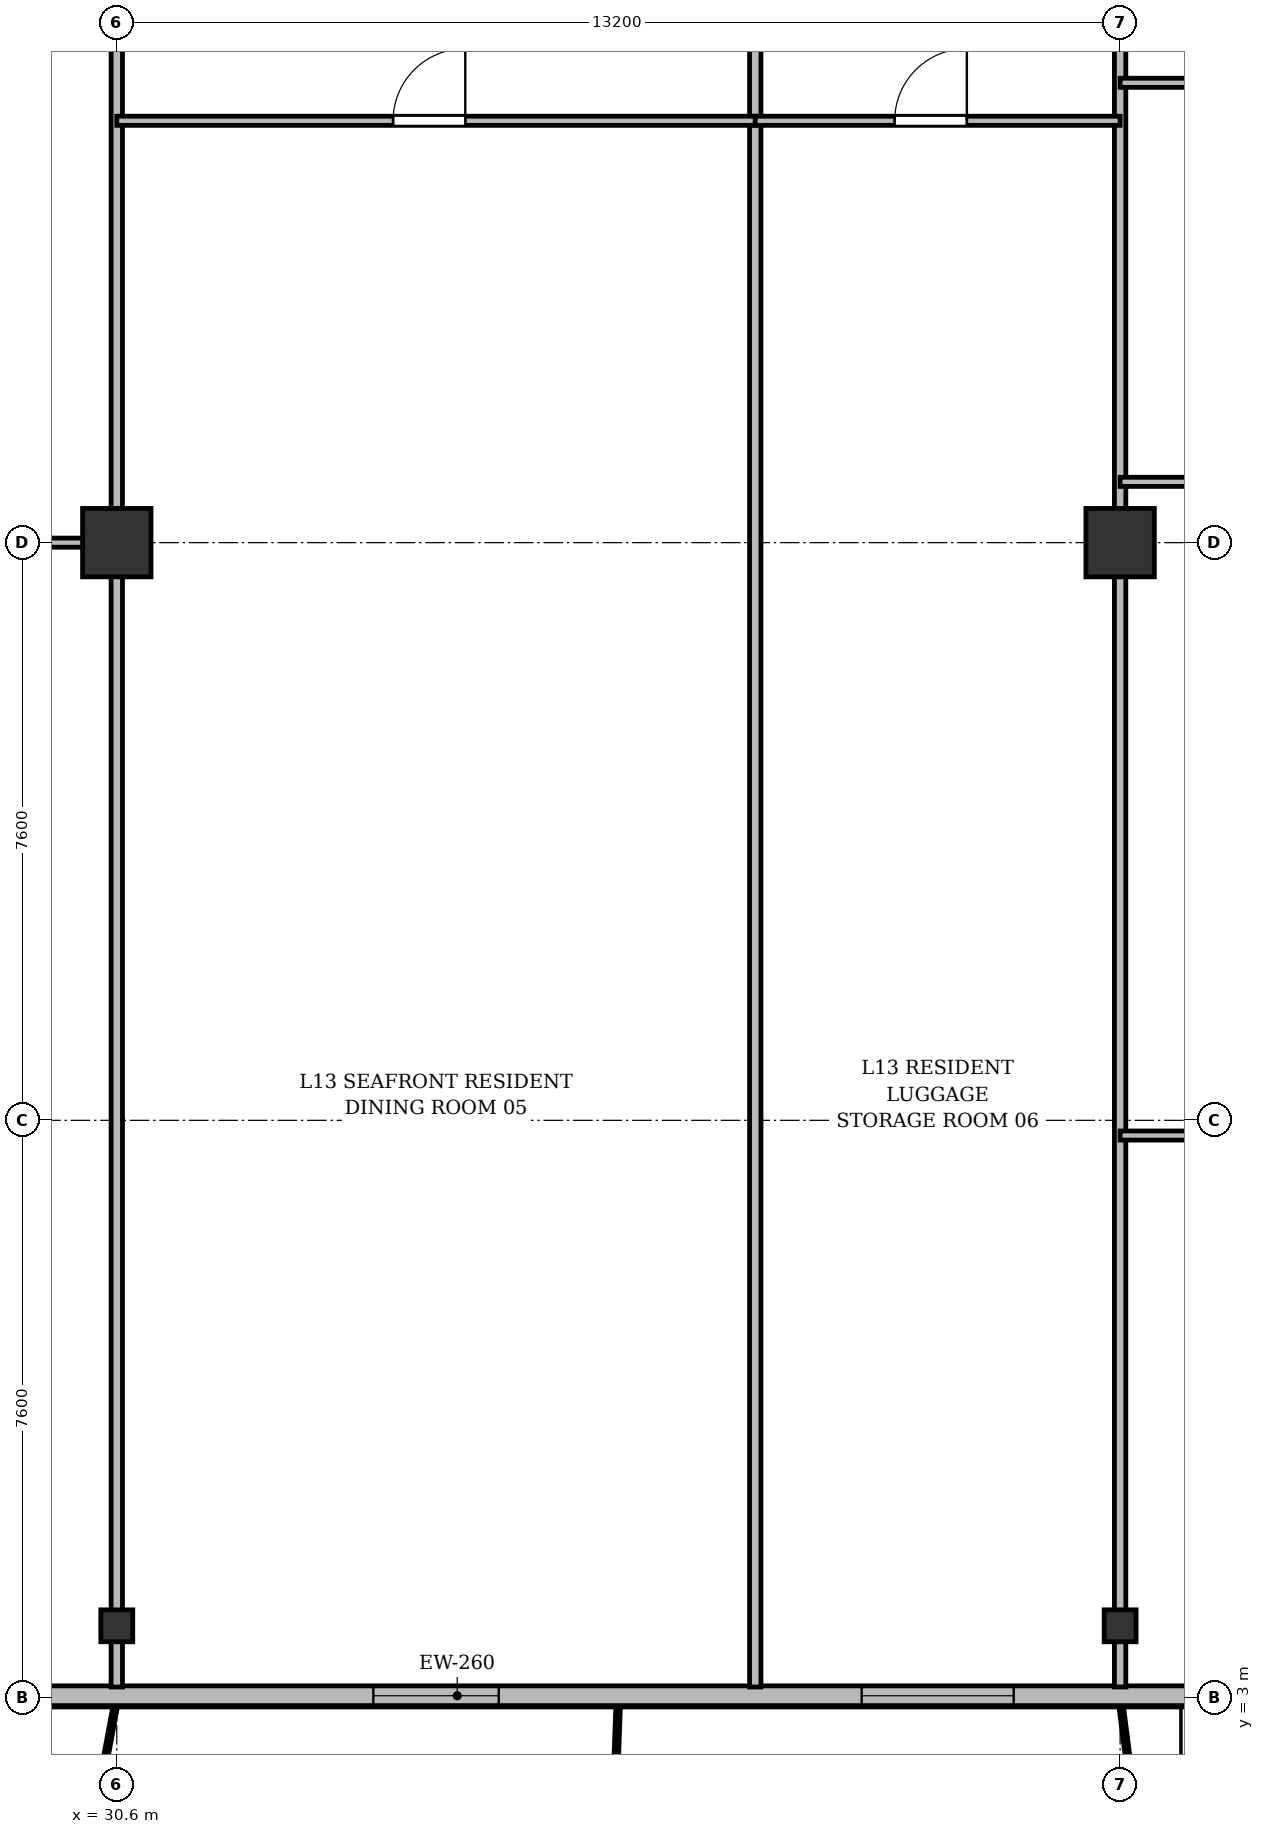
"""IFC4 building model, lengths in metres.
Left out: names, types, materials, properties, quantities, classifications, styles, units other than length and angle.
Written with IfcOpenShell. Run it as: python <this file> out.ifc"""

import sys

from ifc_helpers import new_model, si_unit, direction, frame, frame_2d, origin, origin_2d, place, context, subcontext, project, spatial, rectangle, i_section, extrude, source, transform, mapped, element, fill, save


model = new_model("IFC4")
c1 = context("Model", 3, precision=1e-05, world=origin(), true_north=direction((0.0, 1.0)))
c2 = subcontext(c1, "Body", "Model", "MODEL_VIEW")
j1 = project(units=[si_unit("LENGTHUNIT", "METRE"), si_unit("PLANEANGLEUNIT", "RADIAN")], contexts=[c1])
p1 = place(None, origin())
s1 = spatial("IfcSite", under=j1, at=p1, CompositionType="ELEMENT")
p2 = place(p1, origin())
s2 = spatial("IfcBuilding", under=s1, at=p2, CompositionType="ELEMENT")
p3 = place(p2, frame((0.0, 0.0, 52.3)))
s3 = spatial("IfcBuildingStorey", under=s2, at=p3, CompositionType="ELEMENT", Elevation=52.3)
m1 = source(origin(), c2, "Body", "SweptSolid", [
    extrude(i_section(OverallWidth=0.42, OverallDepth=0.42, WebThickness=0.026, FlangeThickness=0.04, at=origin_2d()), origin(), (0.0, 0.0, 1.0), 3.6),
])
p4 = place(p3, frame((30.6, 3.95, 0.0), z_axis=(0.0, 0.0, 1.0), x_axis=(1.0, 0.0, 0.0)))
e1 = element("IfcColumn", 1, at=p4, inside=s3, PredefinedType="COLUMN", context=c2, shape_type="MappedRepresentation", body=[
    mapped(m1, transform((0.0, 0.0, 0.0), x_axis=(1.0, 0.0, 0.0), y_axis=(0.0, 1.0, 0.0), z_axis=(0.0, 0.0, 1.0), scale=1.0)),
])
m2 = source(origin(), c2, "Body", "SweptSolid", [
    extrude(rectangle(XDim=0.9, YDim=0.9, at=origin_2d()), origin(), (0.0, 0.0, 1.0), 3.6),
])
p5 = place(p3, frame((30.6, 18.2, 0.0), z_axis=(0.0, 0.0, 1.0), x_axis=(1.0, 0.0, 0.0)))
e2 = element("IfcColumn", 2, at=p5, inside=s3, PredefinedType="COLUMN", context=c2, shape_type="MappedRepresentation", body=[
    mapped(m2, transform((0.0, 0.0, 0.0), x_axis=(1.0, 0.0, 0.0), y_axis=(0.0, 1.0, 0.0), z_axis=(0.0, 0.0, 1.0), scale=1.0)),
])
p6 = place(p3, frame((43.8, 3.95, 0.0), z_axis=(0.0, 0.0, 1.0), x_axis=(1.0, 0.0, 0.0)))
e3 = element("IfcColumn", 3, at=p6, inside=s3, PredefinedType="COLUMN", context=c2, shape_type="MappedRepresentation", body=[
    mapped(m1, transform((0.0, 0.0, 0.0), x_axis=(1.0, 0.0, 0.0), y_axis=(0.0, 1.0, 0.0), z_axis=(0.0, 0.0, 1.0), scale=1.0)),
])
p7 = place(p3, frame((43.8, 18.2, 0.0), z_axis=(0.0, 0.0, 1.0), x_axis=(1.0, 0.0, 0.0)))
e4 = element("IfcColumn", 4, at=p7, inside=s3, PredefinedType="COLUMN", context=c2, shape_type="MappedRepresentation", body=[
    mapped(m2, transform((0.0, 0.0, 0.0), x_axis=(1.0, 0.0, 0.0), y_axis=(0.0, 1.0, 0.0), z_axis=(0.0, 0.0, 1.0), scale=1.0)),
])
p8 = place(p3, frame((66.9, 3.03, 0.0), z_axis=(0.0, 0.0, 1.0), x_axis=(-1.0, 0.0, 0.0)))
e5 = element("IfcWall", 5, at=p8, inside=s3, PredefinedType="SOLIDWALL", context=c2, shape_type="SweptSolid", body=[
    extrude(rectangle(XDim=59.4, YDim=0.26, at=frame_2d((29.7, 0.0))), origin(), (0.0, 0.0, 1.0), 3.34),
])
p9 = place(p8, frame((0.495, 0.0, 0.9)))
e6 = element("IfcOpeningElement", 6, at=p9, cuts=e5, PredefinedType="OPENING", context=c2, shape_type="SweptSolid", body=[
    extrude(rectangle(XDim=2.0, YDim=1.95, at=frame_2d((1.0, 0.975))), frame((0.0, 0.14, 0.0), z_axis=(0.0, -1.0, 0.0), x_axis=(1.0, 0.0, 0.0)), (0.0, 0.0, 1.0), 0.28),
])
p10 = place(p8, frame((4.675, 0.0, 0.9)))
e7 = element("IfcOpeningElement", 7, at=p10, cuts=e5, PredefinedType="OPENING", context=c2, shape_type="SweptSolid", body=[
    extrude(rectangle(XDim=1.65, YDim=1.85, at=frame_2d((0.825, 0.925))), frame((0.0, 0.14, 0.0), z_axis=(0.0, -1.0, 0.0), x_axis=(1.0, 0.0, 0.0)), (0.0, 0.0, 1.0), 0.28),
])
p11 = place(p8, frame((11.1, 0.0, 0.9)))
e8 = element("IfcOpeningElement", 8, at=p11, cuts=e5, PredefinedType="OPENING", context=c2, shape_type="SweptSolid", body=[
    extrude(rectangle(XDim=1.8, YDim=1.8, at=frame_2d((0.9, 0.9))), frame((0.0, 0.14, 0.0), z_axis=(0.0, -1.0, 0.0), x_axis=(1.0, 0.0, 0.0)), (0.0, 0.0, 1.0), 0.28),
])
p12 = place(p8, frame((17.007, 0.0, 0.0)))
e9 = element("IfcOpeningElement", 9, at=p12, cuts=e5, PredefinedType="OPENING", context=c2, shape_type="SweptSolid", body=[
    extrude(rectangle(XDim=1.2, YDim=2.2, at=frame_2d((0.6, 1.1))), frame((0.0, 0.14, 0.0), z_axis=(0.0, -1.0, 0.0), x_axis=(1.0, 0.0, 0.0)), (0.0, 0.0, 1.0), 0.28),
])
p13 = place(p8, frame((20.55, 0.0, 0.9)))
e10 = element("IfcOpeningElement", 10, at=p13, cuts=e5, PredefinedType="OPENING", context=c2, shape_type="SweptSolid", body=[
    extrude(rectangle(XDim=1.5, YDim=1.75, at=frame_2d((0.75, 0.875))), frame((0.0, 0.14, 0.0), z_axis=(0.0, -1.0, 0.0), x_axis=(1.0, 0.0, 0.0)), (0.0, 0.0, 1.0), 0.28),
])
p14 = place(p8, frame((24.5, 0.0, 0.9)))
e11 = element("IfcOpeningElement", 11, at=p14, cuts=e5, PredefinedType="OPENING", context=c2, shape_type="SweptSolid", body=[
    extrude(rectangle(XDim=2.0, YDim=1.95, at=frame_2d((1.0, 0.975))), frame((0.0, 0.14, 0.0), z_axis=(0.0, -1.0, 0.0), x_axis=(1.0, 0.0, 0.0)), (0.0, 0.0, 1.0), 0.28),
])
p15 = place(p8, frame((31.275, 0.0, 0.9)))
e12 = element("IfcOpeningElement", 12, at=p15, cuts=e5, PredefinedType="OPENING", context=c2, shape_type="SweptSolid", body=[
    extrude(rectangle(XDim=1.65, YDim=1.85, at=frame_2d((0.825, 0.925))), frame((0.0, 0.14, 0.0), z_axis=(0.0, -1.0, 0.0), x_axis=(1.0, 0.0, 0.0)), (0.0, 0.0, 1.0), 0.28),
])
p16 = place(p8, frame((39.0, 0.0, 0.9)))
e13 = element("IfcOpeningElement", 13, at=p16, cuts=e5, PredefinedType="OPENING", context=c2, shape_type="SweptSolid", body=[
    extrude(rectangle(XDim=1.8, YDim=1.8, at=frame_2d((0.9, 0.9))), frame((0.0, 0.14, 0.0), z_axis=(0.0, -1.0, 0.0), x_axis=(1.0, 0.0, 0.0)), (0.0, 0.0, 1.0), 0.28),
])
p17 = place(p8, frame((45.435, 0.0, 0.0)))
e14 = element("IfcOpeningElement", 14, at=p17, cuts=e5, PredefinedType="OPENING", context=c2, shape_type="SweptSolid", body=[
    extrude(rectangle(XDim=1.2, YDim=2.2, at=frame_2d((0.6, 1.1))), frame((0.0, 0.14, 0.0), z_axis=(0.0, -1.0, 0.0), x_axis=(1.0, 0.0, 0.0)), (0.0, 0.0, 1.0), 0.28),
])
p18 = place(p8, frame((48.6, 0.0, 0.9)))
e15 = element("IfcOpeningElement", 15, at=p18, cuts=e5, PredefinedType="OPENING", context=c2, shape_type="SweptSolid", body=[
    extrude(rectangle(XDim=1.5, YDim=1.75, at=frame_2d((0.75, 0.875))), frame((0.0, 0.14, 0.0), z_axis=(0.0, -1.0, 0.0), x_axis=(1.0, 0.0, 0.0)), (0.0, 0.0, 1.0), 0.28),
])
p19 = place(p8, frame((52.1, 0.0, 0.9)))
e16 = element("IfcOpeningElement", 16, at=p19, cuts=e5, PredefinedType="OPENING", context=c2, shape_type="SweptSolid", body=[
    extrude(rectangle(XDim=2.0, YDim=1.95, at=frame_2d((1.0, 0.975))), frame((0.0, 0.14, 0.0), z_axis=(0.0, -1.0, 0.0), x_axis=(1.0, 0.0, 0.0)), (0.0, 0.0, 1.0), 0.28),
])
p20 = place(p8, frame((56.28, 0.0, 0.9)))
e17 = element("IfcOpeningElement", 17, at=p20, cuts=e5, PredefinedType="OPENING", context=c2, shape_type="SweptSolid", body=[
    extrude(rectangle(XDim=1.65, YDim=1.85, at=frame_2d((0.825, 0.925))), frame((0.0, 0.14, 0.0), z_axis=(0.0, -1.0, 0.0), x_axis=(1.0, 0.0, 0.0)), (0.0, 0.0, 1.0), 0.28),
])
p21 = place(p3, frame((30.6, 3.145, 0.0), z_axis=(0.0, 0.0, 1.0), x_axis=(0.0, 1.0, 0.0)))
e18 = element("IfcWall", 18, at=p21, inside=s3, PredefinedType="PARTITIONING", context=c2, shape_type="SweptSolid", body=[
    extrude(rectangle(XDim=24.455, YDim=0.15, at=frame_2d((12.228, 0.0))), origin(), (0.0, 0.0, 1.0), 2.752),
])
p22 = place(p3, frame((39.0, 3.145, 0.0), z_axis=(0.0, 0.0, 1.0), x_axis=(0.0, 1.0, 0.0)))
e19 = element("IfcWall", 19, at=p22, inside=s3, PredefinedType="PARTITIONING", context=c2, shape_type="SweptSolid", body=[
    extrude(rectangle(XDim=24.455, YDim=0.15, at=frame_2d((12.228, 0.0))), origin(), (0.0, 0.0, 1.0), 2.69),
])
p23 = place(p3, frame((43.8, 3.145, 0.0), z_axis=(0.0, 0.0, 1.0), x_axis=(0.0, 1.0, 0.0)))
e20 = element("IfcWall", 20, at=p23, inside=s3, PredefinedType="PARTITIONING", context=c2, shape_type="SweptSolid", body=[
    extrude(rectangle(XDim=24.455, YDim=0.15, at=frame_2d((12.228, 0.0))), origin(), (0.0, 0.0, 1.0), 2.752),
])
p24 = place(p3, frame((23.4, 18.2, 0.0), z_axis=(0.0, 0.0, 1.0), x_axis=(1.0, 0.0, 0.0)))
e21 = element("IfcWall", 21, at=p24, inside=s3, PredefinedType="PARTITIONING", context=c2, shape_type="SweptSolid", body=[
    extrude(rectangle(XDim=7.2, YDim=0.12, at=frame_2d((3.6, 0.0))), origin(), (0.0, 0.0, 1.0), 2.69),
])
p25 = place(p24, frame((3.125, 0.0, 0.0)))
e22 = element("IfcOpeningElement", 22, at=p25, cuts=e21, PredefinedType="OPENING", context=c2, shape_type="SweptSolid", body=[
    extrude(rectangle(XDim=0.95, YDim=2.15, at=frame_2d((0.475, 1.075))), frame((0.0, 0.07, 0.0), z_axis=(0.0, -1.0, 0.0), x_axis=(1.0, 0.0, 0.0)), (0.0, 0.0, 1.0), 0.14),
])
p26 = place(p3, frame((30.6, 23.75, 0.0), z_axis=(0.0, 0.0, 1.0), x_axis=(1.0, 0.0, 0.0)))
e23 = element("IfcWall", 23, at=p26, inside=s3, PredefinedType="PARTITIONING", context=c2, shape_type="SweptSolid", body=[
    extrude(rectangle(XDim=8.4, YDim=0.12, at=frame_2d((4.2, 0.0))), origin(), (0.0, 0.0, 1.0), 2.752),
])
p27 = place(p26, frame((3.635, 0.0, 0.0)))
e24 = element("IfcOpeningElement", 24, at=p27, cuts=e23, PredefinedType="OPENING", context=c2, shape_type="SweptSolid", body=[
    extrude(rectangle(XDim=0.95, YDim=2.15, at=frame_2d((0.475, 1.075))), frame((0.0, 0.07, 0.0), z_axis=(0.0, -1.0, 0.0), x_axis=(1.0, 0.0, 0.0)), (0.0, 0.0, 1.0), 0.14),
])
p28 = place(p3, frame((39.0, 23.75, 0.0), z_axis=(0.0, 0.0, 1.0), x_axis=(1.0, 0.0, 0.0)))
e25 = element("IfcWall", 25, at=p28, inside=s3, PredefinedType="PARTITIONING", context=c2, shape_type="SweptSolid", body=[
    extrude(rectangle(XDim=4.8, YDim=0.12, at=frame_2d((2.4, 0.0))), origin(), (0.0, 0.0, 1.0), 2.752),
])
p29 = place(p28, frame((1.834, 0.0, 0.0)))
e26 = element("IfcOpeningElement", 26, at=p29, cuts=e25, PredefinedType="OPENING", context=c2, shape_type="SweptSolid", body=[
    extrude(rectangle(XDim=0.95, YDim=2.15, at=frame_2d((0.475, 1.075))), frame((0.0, 0.07, 0.0), z_axis=(0.0, -1.0, 0.0), x_axis=(1.0, 0.0, 0.0)), (0.0, 0.0, 1.0), 0.14),
])
p30 = place(p3, frame((43.8, 19.0, 0.0), z_axis=(0.0, 0.0, 1.0), x_axis=(1.0, 0.0, 0.0)))
e27 = element("IfcWall", 27, at=p30, inside=s3, PredefinedType="PARTITIONING", context=c2, shape_type="SweptSolid", body=[
    extrude(rectangle(XDim=7.2, YDim=0.12, at=frame_2d((3.6, 0.0))), origin(), (0.0, 0.0, 1.0), 2.752),
])
p31 = place(p30, frame((3.125, 0.0, 0.0)))
e28 = element("IfcOpeningElement", 28, at=p31, cuts=e27, PredefinedType="OPENING", context=c2, shape_type="SweptSolid", body=[
    extrude(rectangle(XDim=0.95, YDim=2.15, at=frame_2d((0.475, 1.075))), frame((0.0, 0.07, 0.0), z_axis=(0.0, -1.0, 0.0), x_axis=(1.0, 0.0, 0.0)), (0.0, 0.0, 1.0), 0.14),
])
p32 = place(p3, frame((43.8, 24.25, 0.0), z_axis=(0.0, 0.0, 1.0), x_axis=(1.0, 0.0, 0.0)))
e29 = element("IfcWall", 29, at=p32, inside=s3, PredefinedType="PARTITIONING", context=c2, shape_type="SweptSolid", body=[
    extrude(rectangle(XDim=2.4, YDim=0.12, at=frame_2d((1.2, 0.0))), origin(), (0.0, 0.0, 1.0), 2.752),
])
p33 = place(p3, frame((43.8, 10.4, 0.0), z_axis=(0.0, 0.0, 1.0), x_axis=(1.0, 0.0, 0.0)))
e30 = element("IfcWall", 30, at=p33, inside=s3, PredefinedType="PARTITIONING", context=c2, shape_type="SweptSolid", body=[
    extrude(rectangle(XDim=3.6, YDim=0.12, at=frame_2d((1.8, 0.0))), origin(), (0.0, 0.0, 1.0), 2.752),
])
p34 = place(p33, frame((1.325, 0.0, 0.0)))
e31 = element("IfcOpeningElement", 31, at=p34, cuts=e30, PredefinedType="OPENING", context=c2, shape_type="SweptSolid", body=[
    extrude(rectangle(XDim=0.95, YDim=2.15, at=frame_2d((0.475, 1.075))), frame((0.0, 0.07, 0.0), z_axis=(0.0, -1.0, 0.0), x_axis=(1.0, 0.0, 0.0)), (0.0, 0.0, 1.0), 0.14),
])
m3 = source(origin(), c2, "Body", "SweptSolid", [
    extrude(rectangle(XDim=2.0, YDim=1.95, at=frame_2d((1.0, 0.975))), frame((0.0, 0.03, 0.0), z_axis=(0.0, -1.0, 0.0), x_axis=(1.0, 0.0, 0.0)), (0.0, 0.0, 1.0), 0.06),
])
p35 = place(p14, origin())
e32 = element("IfcWindow", 32, at=p35, inside=s3, PartitioningType="SINGLE_PANEL", PredefinedType="WINDOW", context=c2, shape_type="MappedRepresentation", body=[
    mapped(m3, transform((0.0, 0.0, 0.0), x_axis=(1.0, 0.0, 0.0), y_axis=(0.0, 1.0, 0.0), z_axis=(0.0, 0.0, 1.0), scale=1.0)),
])
fill(e11, e32)
m4 = source(origin(), c2, "Body", "SweptSolid", [
    extrude(rectangle(XDim=1.65, YDim=1.85, at=frame_2d((0.825, 0.925))), frame((0.0, 0.03, 0.0), z_axis=(0.0, -1.0, 0.0), x_axis=(1.0, 0.0, 0.0)), (0.0, 0.0, 1.0), 0.06),
])
p36 = place(p15, origin())
e33 = element("IfcWindow", 33, at=p36, inside=s3, PartitioningType="SINGLE_PANEL", PredefinedType="WINDOW", context=c2, shape_type="MappedRepresentation", body=[
    mapped(m4, transform((0.0, 0.0, 0.0), x_axis=(1.0, 0.0, 0.0), y_axis=(0.0, 1.0, 0.0), z_axis=(0.0, 0.0, 1.0), scale=1.0)),
])
fill(e12, e33)
m5 = source(origin(), c2, "Body", "SweptSolid", [
    extrude(rectangle(XDim=0.95, YDim=2.15, at=frame_2d((0.475, 1.075))), frame((0.0, 0.025, 0.0), z_axis=(0.0, -1.0, 0.0), x_axis=(1.0, 0.0, 0.0)), (0.0, 0.0, 1.0), 0.05),
])
p37 = place(p27, origin())
e34 = element("IfcDoor", 34, at=p37, inside=s3, OperationType="SINGLE_SWING_RIGHT", PredefinedType="DOOR", context=c2, shape_type="MappedRepresentation", body=[
    mapped(m5, transform((0.0, 0.0, 0.0), x_axis=(1.0, 0.0, 0.0), y_axis=(0.0, 1.0, 0.0), z_axis=(0.0, 0.0, 1.0), scale=1.0)),
])
fill(e24, e34)
p38 = place(p29, origin())
e35 = element("IfcDoor", 35, at=p38, inside=s3, OperationType="SINGLE_SWING_RIGHT", PredefinedType="DOOR", context=c2, shape_type="MappedRepresentation", body=[
    mapped(m5, transform((0.0, 0.0, 0.0), x_axis=(1.0, 0.0, 0.0), y_axis=(0.0, 1.0, 0.0), z_axis=(0.0, 0.0, 1.0), scale=1.0)),
])
fill(e26, e35)
save(model, sys.argv[1])
